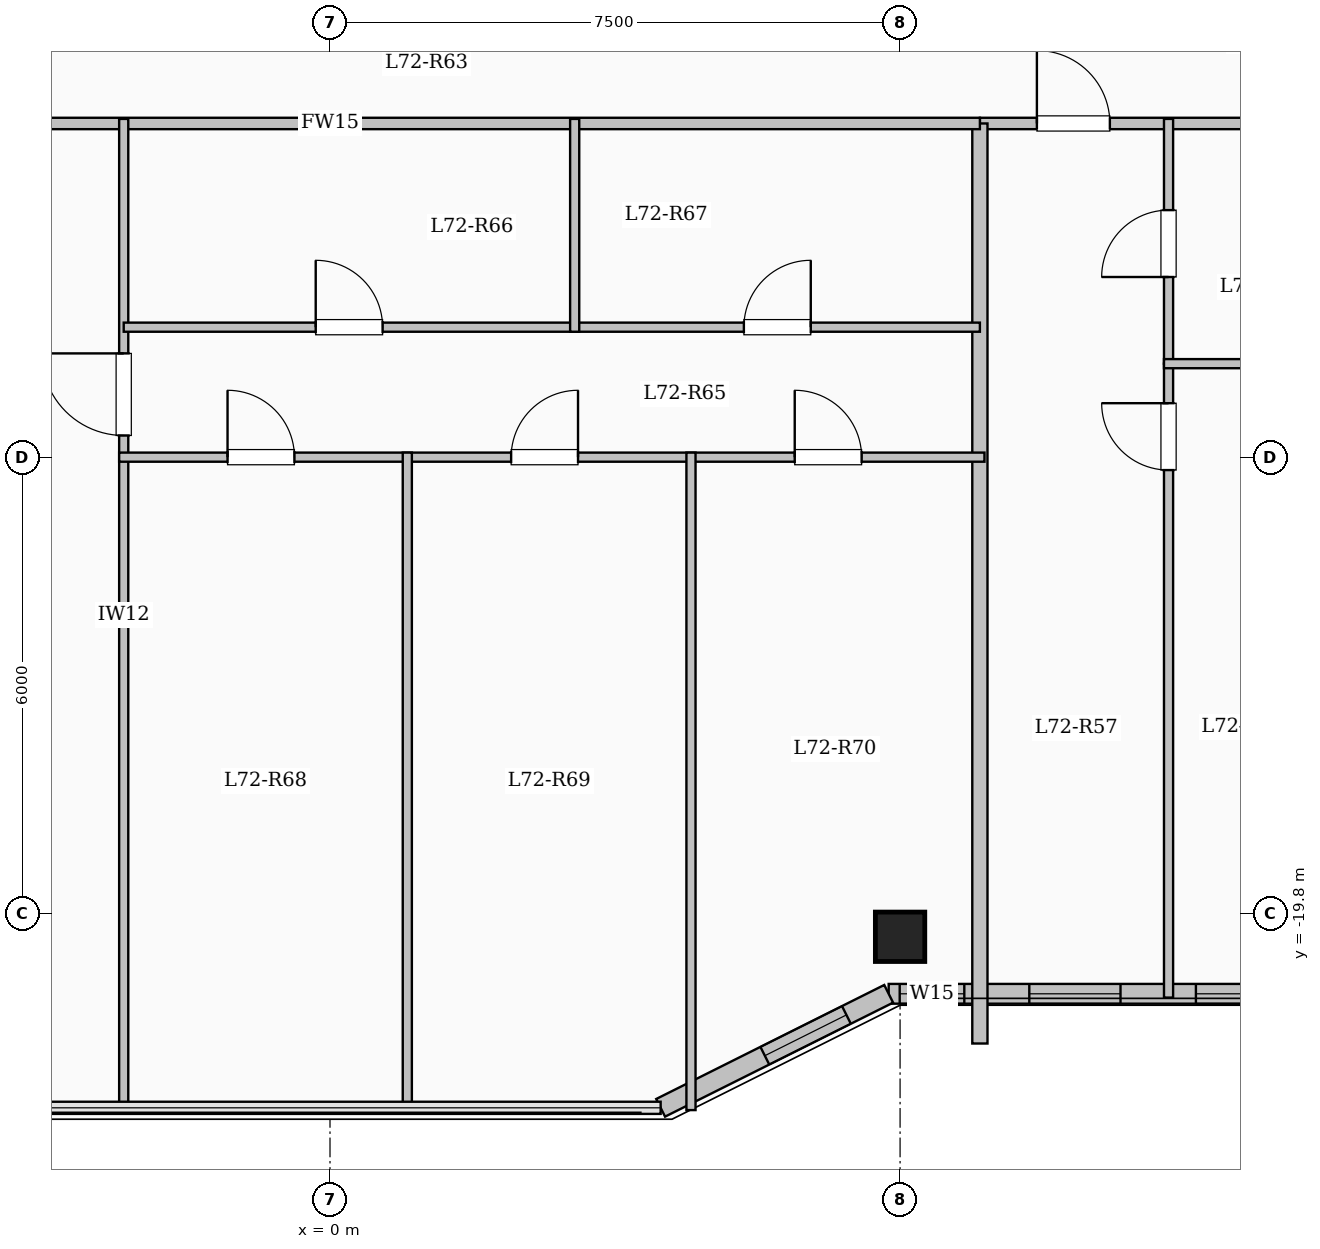
"""IFC4 building model, lengths in metres.
Left out: names, types, materials, properties, quantities, classifications, styles, units other than length and angle.
Written with IfcOpenShell. Run it as: python <this file> out.ifc"""

import sys

from ifc_helpers import new_model, si_unit, direction, frame, frame_2d, origin, origin_2d, place, context, subcontext, project, spatial, rectangle, extrude, element, fill, save


model = new_model("IFC4")
c1 = context("Model", 3, precision=1e-05, world=origin(), true_north=direction((0.0, 1.0)))
c2 = subcontext(c1, "Body", "Model", "MODEL_VIEW")
j1 = project(units=[si_unit("LENGTHUNIT", "METRE"), si_unit("PLANEANGLEUNIT", "RADIAN")], contexts=[c1])
p1 = place(None, origin())
s1 = spatial("IfcSite", under=j1, at=p1, CompositionType="ELEMENT")
p2 = place(p1, origin())
s2 = spatial("IfcBuilding", under=s1, at=p2, CompositionType="ELEMENT")
p3 = place(p2, frame((0.0, 0.0, 264.95)))
s3 = spatial("IfcBuildingStorey", under=s2, at=p3, CompositionType="ELEMENT", Elevation=264.95)
p4 = place(p3, frame((7.5, -20.1, 0.0), z_axis=(0.0, 0.0, 1.0), x_axis=(1.0, 0.0, 0.0)))
e1 = element("IfcColumn", 1, at=p4, inside=s3, PredefinedType="COLUMN", context=c2, shape_type="SweptSolid", body=[
    extrude(rectangle(XDim=0.65, YDim=0.65, at=origin_2d()), origin(), (0.0, 0.0, 1.0), 3.35),
])
p5 = place(p3, frame((17.85, -20.85, 0.0), z_axis=(0.0, 0.0, 1.0), x_axis=(-1.0, 0.0, 0.0)))
e2 = element("IfcWall", 2, at=p5, inside=s3, PredefinedType="SOLIDWALL", context=c2, shape_type="SweptSolid", body=[
    extrude(rectangle(XDim=10.5, YDim=0.26, at=frame_2d((5.25, 0.0))), origin(), (0.0, 0.0, 1.0), 3.1),
])
p6 = place(p5, frame((0.613, 0.0, 0.95)))
e3 = element("IfcOpeningElement", 3, at=p6, cuts=e2, PredefinedType="OPENING", context=c2, shape_type="SweptSolid", body=[
    extrude(rectangle(XDim=1.2, YDim=1.5, at=frame_2d((0.6, 0.75))), frame((0.0, 0.14, 0.0), z_axis=(0.0, -1.0, 0.0), x_axis=(1.0, 0.0, 0.0)), (0.0, 0.0, 1.0), 0.28),
])
p7 = place(p5, frame((3.025, 0.0, 0.95)))
e4 = element("IfcOpeningElement", 4, at=p7, cuts=e2, PredefinedType="OPENING", context=c2, shape_type="SweptSolid", body=[
    extrude(rectangle(XDim=1.2, YDim=1.5, at=frame_2d((0.6, 0.75))), frame((0.0, 0.14, 0.0), z_axis=(0.0, -1.0, 0.0), x_axis=(1.0, 0.0, 0.0)), (0.0, 0.0, 1.0), 0.28),
])
p8 = place(p5, frame((5.258, 0.0, 0.95)))
e5 = element("IfcOpeningElement", 5, at=p8, cuts=e2, PredefinedType="OPENING", context=c2, shape_type="SweptSolid", body=[
    extrude(rectangle(XDim=1.2, YDim=1.5, at=frame_2d((0.6, 0.75))), frame((0.0, 0.14, 0.0), z_axis=(0.0, -1.0, 0.0), x_axis=(1.0, 0.0, 0.0)), (0.0, 0.0, 1.0), 0.28),
])
p9 = place(p5, frame((7.45, 0.0, 0.95)))
e6 = element("IfcOpeningElement", 6, at=p9, cuts=e2, PredefinedType="OPENING", context=c2, shape_type="SweptSolid", body=[
    extrude(rectangle(XDim=1.2, YDim=1.5, at=frame_2d((0.6, 0.75))), frame((0.0, 0.14, 0.0), z_axis=(0.0, -1.0, 0.0), x_axis=(1.0, 0.0, 0.0)), (0.0, 0.0, 1.0), 0.28),
])
p10 = place(p5, frame((9.505, 0.0, 0.95)))
e7 = element("IfcOpeningElement", 7, at=p10, cuts=e2, PredefinedType="OPENING", context=c2, shape_type="SweptSolid", body=[
    extrude(rectangle(XDim=0.85, YDim=1.5, at=frame_2d((0.425, 0.75))), frame((0.0, 0.14, 0.0), z_axis=(0.0, -1.0, 0.0), x_axis=(1.0, 0.0, 0.0)), (0.0, 0.0, 1.0), 0.28),
])
p11 = place(p3, frame((7.35, -20.85, 0.0), z_axis=(0.0, 0.0, 1.0), x_axis=(-0.894427191, -0.4472135955, 0.0)))
e8 = element("IfcWall", 8, at=p11, inside=s3, PredefinedType="SOLIDWALL", context=c2, shape_type="SweptSolid", body=[
    extrude(rectangle(XDim=3.354, YDim=0.26, at=frame_2d((1.677, 0.0))), origin(), (0.0, 0.0, 1.0), 3.1),
])
p12 = place(p11, frame((0.622, 0.0, 0.95)))
e9 = element("IfcOpeningElement", 9, at=p12, cuts=e8, PredefinedType="OPENING", context=c2, shape_type="SweptSolid", body=[
    extrude(rectangle(XDim=1.2, YDim=1.5, at=frame_2d((0.6, 0.75))), frame((0.0, 0.14, 0.0), z_axis=(0.0, -1.0, 0.0), x_axis=(1.0, 0.0, 0.0)), (0.0, 0.0, 1.0), 0.28),
])
p13 = place(p3, frame((8.55, -9.4, 0.0), z_axis=(0.0, 0.0, 1.0), x_axis=(1.0, 0.0, 0.0)))
e10 = element("IfcWall", 10, at=p13, inside=s3, PredefinedType="PARTITIONING", context=c2, shape_type="SweptSolid", body=[
    extrude(rectangle(XDim=9.2, YDim=0.15, at=frame_2d((4.6, 0.0))), origin(), (0.0, 0.0, 1.0), 3.1),
])
p14 = place(p13, frame((0.75, 0.0, 0.0)))
e11 = element("IfcOpeningElement", 11, at=p14, cuts=e10, PredefinedType="OPENING", context=c2, shape_type="SweptSolid", body=[
    extrude(rectangle(XDim=0.96, YDim=2.15, at=frame_2d((0.48, 1.075))), frame((0.0, 0.085, 0.0), z_axis=(0.0, -1.0, 0.0), x_axis=(1.0, 0.0, 0.0)), (0.0, 0.0, 1.0), 0.17),
])
p15 = place(p13, frame((5.142, 0.0, 0.0)))
e12 = element("IfcOpeningElement", 12, at=p15, cuts=e10, PredefinedType="OPENING", context=c2, shape_type="SweptSolid", body=[
    extrude(rectangle(XDim=0.96, YDim=2.15, at=frame_2d((0.48, 1.075))), frame((0.0, 0.085, 0.0), z_axis=(0.0, -1.0, 0.0), x_axis=(1.0, 0.0, 0.0)), (0.0, 0.0, 1.0), 0.17),
])
p16 = place(p3, frame((11.032, -20.9, 0.0), z_axis=(0.0, 0.0, 1.0), x_axis=(0.0, 1.0, 0.0)))
e13 = element("IfcWall", 13, at=p16, inside=s3, PredefinedType="PARTITIONING", context=c2, shape_type="SweptSolid", body=[
    extrude(rectangle(XDim=8.34, YDim=0.12, at=frame_2d((4.17, 0.0))), origin(), (0.0, 0.0, 1.0), 3.1),
])
p17 = place(p16, frame((6.94, 0.0, 0.0)))
e14 = element("IfcOpeningElement", 14, at=p17, cuts=e13, PredefinedType="OPENING", context=c2, shape_type="SweptSolid", body=[
    extrude(rectangle(XDim=0.88, YDim=2.1, at=frame_2d((0.44, 1.05))), frame((0.0, 0.07, 0.0), z_axis=(0.0, -1.0, 0.0), x_axis=(1.0, 0.0, 0.0)), (0.0, 0.0, 1.0), 0.14),
])
p18 = place(p3, frame((11.032, -12.56, 0.0), z_axis=(0.0, 0.0, 1.0), x_axis=(0.0, 1.0, 0.0)))
e15 = element("IfcWall", 15, at=p18, inside=s3, PredefinedType="PARTITIONING", context=c2, shape_type="SweptSolid", body=[
    extrude(rectangle(XDim=3.22, YDim=0.12, at=frame_2d((1.61, 0.0))), origin(), (0.0, 0.0, 1.0), 3.1),
])
p19 = place(p18, frame((1.14, 0.0, 0.0)))
e16 = element("IfcOpeningElement", 16, at=p19, cuts=e15, PredefinedType="OPENING", context=c2, shape_type="SweptSolid", body=[
    extrude(rectangle(XDim=0.88, YDim=2.1, at=frame_2d((0.44, 1.05))), frame((0.0, 0.07, 0.0), z_axis=(0.0, -1.0, 0.0), x_axis=(1.0, 0.0, 0.0)), (0.0, 0.0, 1.0), 0.14),
])
p20 = place(p3, frame((10.972, -12.56, 0.0), z_axis=(0.0, 0.0, 1.0), x_axis=(1.0, 0.0, 0.0)))
e17 = element("IfcWall", 17, at=p20, inside=s3, PredefinedType="PARTITIONING", context=c2, shape_type="SweptSolid", body=[
    extrude(rectangle(XDim=2.08, YDim=0.12, at=frame_2d((1.04, 0.0))), origin(), (0.0, 0.0, 1.0), 2.785),
])
p21 = place(p3, frame((8.55, -21.504, 0.0), z_axis=(0.0, 0.0, 1.0), x_axis=(0.0, 1.0, 0.0)))
e18 = element("IfcWall", 18, at=p21, inside=s3, PredefinedType="SOLIDWALL", context=c2, shape_type="SweptSolid", body=[
    extrude(rectangle(XDim=12.104, YDim=0.2, at=frame_2d((6.052, 0.0))), origin(), (0.0, 0.0, 1.0), 3.1),
])
p22 = place(p3, frame((-8.55, -9.4, 0.0), z_axis=(0.0, 0.0, 1.0), x_axis=(1.0, 0.0, 0.0)))
e19 = element("IfcWall", 19, at=p22, inside=s3, PredefinedType="PARTITIONING", context=c2, shape_type="SweptSolid", body=[
    extrude(rectangle(XDim=17.1, YDim=0.15, at=frame_2d((8.55, 0.0))), origin(), (0.0, 0.0, 1.0), 3.1),
])
p23 = place(p22, frame((1.75, 0.0, 0.0)))
e20 = element("IfcOpeningElement", 20, at=p23, cuts=e19, PredefinedType="OPENING", context=c2, shape_type="SweptSolid", body=[
    extrude(rectangle(XDim=0.96, YDim=2.15, at=frame_2d((0.48, 1.075))), frame((0.0, 0.085, 0.0), z_axis=(0.0, -1.0, 0.0), x_axis=(1.0, 0.0, 0.0)), (0.0, 0.0, 1.0), 0.17),
])
p24 = place(p3, frame((-2.714, -22.38, 0.0), z_axis=(0.0, 0.0, 1.0), x_axis=(0.0, 1.0, 0.0)))
e21 = element("IfcWall", 21, at=p24, inside=s3, PredefinedType="PARTITIONING", context=c2, shape_type="SweptSolid", body=[
    extrude(rectangle(XDim=13.04, YDim=0.12, at=frame_2d((6.52, 0.0))), origin(), (0.0, 0.0, 1.0), 3.1),
])
p25 = place(p24, frame((8.875, 0.0, 0.0)))
e22 = element("IfcOpeningElement", 22, at=p25, cuts=e21, PredefinedType="OPENING", context=c2, shape_type="SweptSolid", body=[
    extrude(rectangle(XDim=1.08, YDim=2.15, at=frame_2d((0.54, 1.075))), frame((0.0, 0.07, 0.0), z_axis=(0.0, -1.0, 0.0), x_axis=(1.0, 0.0, 0.0)), (0.0, 0.0, 1.0), 0.14),
])
p26 = place(p3, frame((-2.714, -12.08, 0.0), z_axis=(0.0, 0.0, 1.0), x_axis=(1.0, 0.0, 0.0)))
e23 = element("IfcWall", 23, at=p26, inside=s3, PredefinedType="PARTITIONING", context=c2, shape_type="SweptSolid", body=[
    extrude(rectangle(XDim=5.933, YDim=0.12, at=frame_2d((2.967, 0.0))), origin(), (0.0, 0.0, 1.0), 2.785),
])
p27 = place(p26, frame((2.526, 0.0, 0.0)))
e24 = element("IfcOpeningElement", 24, at=p27, cuts=e23, PredefinedType="OPENING", context=c2, shape_type="SweptSolid", body=[
    extrude(rectangle(XDim=0.88, YDim=2.1, at=frame_2d((0.44, 1.05))), frame((0.0, 0.07, 0.0), z_axis=(0.0, -1.0, 0.0), x_axis=(1.0, 0.0, 0.0)), (0.0, 0.0, 1.0), 0.14),
])
p28 = place(p3, frame((3.219, -12.08, 0.0), z_axis=(0.0, 0.0, 1.0), x_axis=(1.0, 0.0, 0.0)))
e25 = element("IfcWall", 25, at=p28, inside=s3, PredefinedType="PARTITIONING", context=c2, shape_type="SweptSolid", body=[
    extrude(rectangle(XDim=5.331, YDim=0.12, at=frame_2d((2.666, 0.0))), origin(), (0.0, 0.0, 1.0), 2.785),
])
p29 = place(p28, frame((2.226, 0.0, 0.0)))
e26 = element("IfcOpeningElement", 26, at=p29, cuts=e25, PredefinedType="OPENING", context=c2, shape_type="SweptSolid", body=[
    extrude(rectangle(XDim=0.88, YDim=2.1, at=frame_2d((0.44, 1.05))), frame((0.0, 0.07, 0.0), z_axis=(0.0, -1.0, 0.0), x_axis=(1.0, 0.0, 0.0)), (0.0, 0.0, 1.0), 0.14),
])
p30 = place(p3, frame((-2.774, -13.79, 0.0), z_axis=(0.0, 0.0, 1.0), x_axis=(1.0, 0.0, 0.0)))
e27 = element("IfcWall", 27, at=p30, inside=s3, PredefinedType="PARTITIONING", context=c2, shape_type="SweptSolid", body=[
    extrude(rectangle(XDim=11.384, YDim=0.12, at=frame_2d((5.692, 0.0))), origin(), (0.0, 0.0, 1.0), 2.785),
])
p31 = place(p30, frame((1.426, 0.0, 0.0)))
e28 = element("IfcOpeningElement", 28, at=p31, cuts=e27, PredefinedType="OPENING", context=c2, shape_type="SweptSolid", body=[
    extrude(rectangle(XDim=0.88, YDim=2.1, at=frame_2d((0.44, 1.05))), frame((0.0, 0.07, 0.0), z_axis=(0.0, -1.0, 0.0), x_axis=(1.0, 0.0, 0.0)), (0.0, 0.0, 1.0), 0.14),
])
p32 = place(p30, frame((5.157, 0.0, 0.0)))
e29 = element("IfcOpeningElement", 29, at=p32, cuts=e27, PredefinedType="OPENING", context=c2, shape_type="SweptSolid", body=[
    extrude(rectangle(XDim=0.88, YDim=2.1, at=frame_2d((0.44, 1.05))), frame((0.0, 0.07, 0.0), z_axis=(0.0, -1.0, 0.0), x_axis=(1.0, 0.0, 0.0)), (0.0, 0.0, 1.0), 0.14),
])
p33 = place(p30, frame((8.888, 0.0, 0.0)))
e30 = element("IfcOpeningElement", 30, at=p33, cuts=e27, PredefinedType="OPENING", context=c2, shape_type="SweptSolid", body=[
    extrude(rectangle(XDim=0.88, YDim=2.1, at=frame_2d((0.44, 1.05))), frame((0.0, 0.07, 0.0), z_axis=(0.0, -1.0, 0.0), x_axis=(1.0, 0.0, 0.0)), (0.0, 0.0, 1.0), 0.14),
])
p34 = place(p3, frame((3.219, -12.14, 0.0), z_axis=(0.0, 0.0, 1.0), x_axis=(0.0, 1.0, 0.0)))
e31 = element("IfcWall", 31, at=p34, inside=s3, PredefinedType="PARTITIONING", context=c2, shape_type="SweptSolid", body=[
    extrude(rectangle(XDim=2.8, YDim=0.12, at=frame_2d((1.4, 0.0))), origin(), (0.0, 0.0, 1.0), 3.1),
])
for number, where, z_axis, x_axis in (
    (32, (1.017, -22.38, 0.0), (0.0, 0.0, 1.0), (0.0, 1.0, 0.0)),
    (33, (4.749, -22.38, 0.0), (0.0, 0.0, 1.0), (0.0, 1.0, 0.0)),
):
    element("IfcWall", number, at=place(p3, frame(where, z_axis=z_axis, x_axis=x_axis)), inside=s3, PredefinedType="PARTITIONING", context=c2, shape_type="SweptSolid", body=[
        extrude(rectangle(XDim=8.65, YDim=0.12, at=frame_2d((4.325, 0.0))), origin(), (0.0, 0.0, 1.0), 3.1),
    ])
p35 = place(p8, origin())
e34 = element("IfcWindow", 34, at=p35, inside=s3, PartitioningType="SINGLE_PANEL", PredefinedType="WINDOW", context=c2, shape_type="SweptSolid", body=[
    extrude(rectangle(XDim=1.2, YDim=1.5, at=frame_2d((0.6, 0.75))), frame((0.0, 0.03, 0.0), z_axis=(0.0, -1.0, 0.0), x_axis=(1.0, 0.0, 0.0)), (0.0, 0.0, 1.0), 0.06),
])
fill(e5, e34)
p36 = place(p9, origin())
e35 = element("IfcWindow", 35, at=p36, inside=s3, PartitioningType="SINGLE_PANEL", PredefinedType="WINDOW", context=c2, shape_type="SweptSolid", body=[
    extrude(rectangle(XDim=1.2, YDim=1.5, at=frame_2d((0.6, 0.75))), frame((0.0, 0.03, 0.0), z_axis=(0.0, -1.0, 0.0), x_axis=(1.0, 0.0, 0.0)), (0.0, 0.0, 1.0), 0.06),
])
fill(e6, e35)
p37 = place(p10, origin())
e36 = element("IfcWindow", 36, at=p37, inside=s3, PartitioningType="SINGLE_PANEL", PredefinedType="WINDOW", context=c2, shape_type="SweptSolid", body=[
    extrude(rectangle(XDim=0.85, YDim=1.5, at=frame_2d((0.425, 0.75))), frame((0.0, 0.03, 0.0), z_axis=(0.0, -1.0, 0.0), x_axis=(1.0, 0.0, 0.0)), (0.0, 0.0, 1.0), 0.06),
])
fill(e7, e36)
p38 = place(p12, origin())
e37 = element("IfcWindow", 37, at=p38, inside=s3, PartitioningType="SINGLE_PANEL", PredefinedType="WINDOW", context=c2, shape_type="SweptSolid", body=[
    extrude(rectangle(XDim=1.2, YDim=1.5, at=frame_2d((0.6, 0.75))), frame((0.0, 0.03, 0.0), z_axis=(0.0, -1.0, 0.0), x_axis=(1.0, 0.0, 0.0)), (0.0, 0.0, 1.0), 0.06),
])
fill(e9, e37)
p39 = place(p14, origin())
e38 = element("IfcDoor", 38, at=p39, inside=s3, OperationType="SINGLE_SWING_LEFT", PredefinedType="DOOR", context=c2, shape_type="SweptSolid", body=[
    extrude(rectangle(XDim=0.96, YDim=2.15, at=frame_2d((0.48, 1.075))), frame((0.0, 0.025, 0.0), z_axis=(0.0, -1.0, 0.0), x_axis=(1.0, 0.0, 0.0)), (0.0, 0.0, 1.0), 0.05),
])
fill(e11, e38)
p40 = place(p17, origin())
e39 = element("IfcDoor", 39, at=p40, inside=s3, OperationType="SINGLE_SWING_RIGHT", PredefinedType="DOOR", context=c2, shape_type="SweptSolid", body=[
    extrude(rectangle(XDim=0.88, YDim=2.1, at=frame_2d((0.44, 1.05))), frame((0.0, 0.025, 0.0), z_axis=(0.0, -1.0, 0.0), x_axis=(1.0, 0.0, 0.0)), (0.0, 0.0, 1.0), 0.05),
])
fill(e14, e39)
p41 = place(p19, origin())
e40 = element("IfcDoor", 40, at=p41, inside=s3, OperationType="SINGLE_SWING_LEFT", PredefinedType="DOOR", context=c2, shape_type="SweptSolid", body=[
    extrude(rectangle(XDim=0.88, YDim=2.1, at=frame_2d((0.44, 1.05))), frame((0.0, 0.025, 0.0), z_axis=(0.0, -1.0, 0.0), x_axis=(1.0, 0.0, 0.0)), (0.0, 0.0, 1.0), 0.05),
])
fill(e16, e40)
p42 = place(p25, origin())
e41 = element("IfcDoor", 41, at=p42, inside=s3, OperationType="SINGLE_SWING_RIGHT", PredefinedType="DOOR", context=c2, shape_type="SweptSolid", body=[
    extrude(rectangle(XDim=1.08, YDim=2.15, at=frame_2d((0.54, 1.075))), frame((0.0, 0.025, 0.0), z_axis=(0.0, -1.0, 0.0), x_axis=(1.0, 0.0, 0.0)), (0.0, 0.0, 1.0), 0.05),
])
fill(e22, e41)
p43 = place(p27, origin())
e42 = element("IfcDoor", 42, at=p43, inside=s3, OperationType="SINGLE_SWING_LEFT", PredefinedType="DOOR", context=c2, shape_type="SweptSolid", body=[
    extrude(rectangle(XDim=0.88, YDim=2.1, at=frame_2d((0.44, 1.05))), frame((0.0, 0.025, 0.0), z_axis=(0.0, -1.0, 0.0), x_axis=(1.0, 0.0, 0.0)), (0.0, 0.0, 1.0), 0.05),
])
fill(e24, e42)
p44 = place(p29, origin())
e43 = element("IfcDoor", 43, at=p44, inside=s3, OperationType="SINGLE_SWING_RIGHT", PredefinedType="DOOR", context=c2, shape_type="SweptSolid", body=[
    extrude(rectangle(XDim=0.88, YDim=2.1, at=frame_2d((0.44, 1.05))), frame((0.0, 0.025, 0.0), z_axis=(0.0, -1.0, 0.0), x_axis=(1.0, 0.0, 0.0)), (0.0, 0.0, 1.0), 0.05),
])
fill(e26, e43)
p45 = place(p31, origin())
e44 = element("IfcDoor", 44, at=p45, inside=s3, OperationType="SINGLE_SWING_LEFT", PredefinedType="DOOR", context=c2, shape_type="SweptSolid", body=[
    extrude(rectangle(XDim=0.88, YDim=2.1, at=frame_2d((0.44, 1.05))), frame((0.0, 0.025, 0.0), z_axis=(0.0, -1.0, 0.0), x_axis=(1.0, 0.0, 0.0)), (0.0, 0.0, 1.0), 0.05),
])
fill(e28, e44)
p46 = place(p32, origin())
e45 = element("IfcDoor", 45, at=p46, inside=s3, OperationType="SINGLE_SWING_RIGHT", PredefinedType="DOOR", context=c2, shape_type="SweptSolid", body=[
    extrude(rectangle(XDim=0.88, YDim=2.1, at=frame_2d((0.44, 1.05))), frame((0.0, 0.025, 0.0), z_axis=(0.0, -1.0, 0.0), x_axis=(1.0, 0.0, 0.0)), (0.0, 0.0, 1.0), 0.05),
])
fill(e29, e45)
p47 = place(p33, origin())
e46 = element("IfcDoor", 46, at=p47, inside=s3, OperationType="SINGLE_SWING_LEFT", PredefinedType="DOOR", context=c2, shape_type="SweptSolid", body=[
    extrude(rectangle(XDim=0.88, YDim=2.1, at=frame_2d((0.44, 1.05))), frame((0.0, 0.025, 0.0), z_axis=(0.0, -1.0, 0.0), x_axis=(1.0, 0.0, 0.0)), (0.0, 0.0, 1.0), 0.05),
])
fill(e30, e46)
save(model, sys.argv[1])
